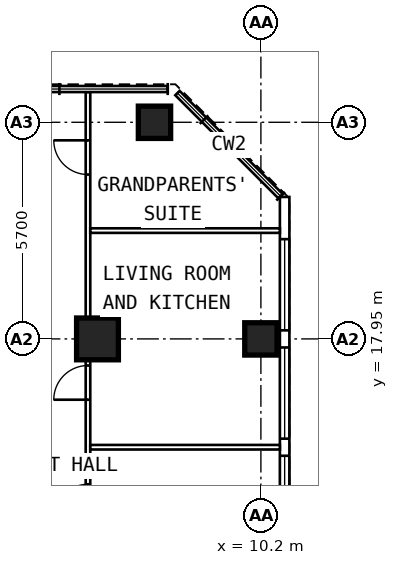
"""IFC4 building model, lengths in metres.
Left out: names, types, materials, properties, quantities, classifications, styles, units other than length and angle.
Written with IfcOpenShell. Run it as: python <this file> out.ifc"""

import sys

from ifc_helpers import new_model, si_unit, direction, frame, frame_2d, origin, origin_2d, place, context, subcontext, project, spatial, rectangle, extrude, element, fill, save


model = new_model("IFC4")
c1 = context("Model", 3, precision=1e-05, world=origin(), true_north=direction((0.0, 1.0)))
c2 = subcontext(c1, "Body", "Model", "MODEL_VIEW")
j1 = project(units=[si_unit("LENGTHUNIT", "METRE"), si_unit("PLANEANGLEUNIT", "RADIAN")], contexts=[c1])
p1 = place(None, origin())
s1 = spatial("IfcSite", under=j1, at=p1, CompositionType="ELEMENT")
p2 = place(p1, origin())
s2 = spatial("IfcBuilding", under=s1, at=p2, CompositionType="ELEMENT")
p3 = place(p2, frame((0.0, 0.0, 238.8)))
s3 = spatial("IfcBuildingStorey", under=s2, at=p3, CompositionType="ELEMENT", Elevation=238.8)
for number, where, z_axis, x_axis in (
    (1, (10.2, 17.95, 0.0), (0.0, 0.0, 1.0), (0.0, 1.0, 0.0)),
    (2, (7.4, 23.65, 0.0), (0.0, 0.0, 1.0), (0.0, 1.0, 0.0)),
):
    element("IfcColumn", number, at=place(p3, frame(where, z_axis=z_axis, x_axis=x_axis)), inside=s3, PredefinedType="COLUMN", context=c2, shape_type="SweptSolid", body=[
        extrude(rectangle(XDim=0.85, YDim=0.85, at=origin_2d()), origin(), (0.0, 0.0, 1.0), 3.6),
    ])
p4 = place(p3, frame((5.9, 17.95, 0.0), z_axis=(0.0, 0.0, 1.0), x_axis=(0.0, 1.0, 0.0)))
e3 = element("IfcColumn", 3, at=p4, inside=s3, PredefinedType="COLUMN", context=c2, shape_type="SweptSolid", body=[
    extrude(rectangle(XDim=1.1, YDim=1.1, at=origin_2d()), origin(), (0.0, 0.0, 1.0), 3.6),
])
p5 = place(p3, frame((10.825, 6.409, 0.0), z_axis=(0.0, 0.0, 1.0), x_axis=(0.0, 1.0, 0.0)))
e4 = element("IfcWall", 4, at=p5, inside=s3, PredefinedType="SOLIDWALL", context=c2, shape_type="SweptSolid", body=[
    extrude(rectangle(XDim=15.276, YDim=0.25, at=frame_2d((7.638, 0.0))), origin(), (0.0, 0.0, 1.0), 3.35),
])
p6 = place(p5, frame((0.366, 0.0, 0.8)))
e5 = element("IfcOpeningElement", 5, at=p6, cuts=e4, PredefinedType="OPENING", context=c2, shape_type="SweptSolid", body=[
    extrude(rectangle(XDim=2.4, YDim=1.8, at=frame_2d((1.2, 0.9))), frame((0.0, 0.137, 0.0), z_axis=(0.0, -1.0, 0.0), x_axis=(1.0, 0.0, 0.0)), (0.0, 0.0, 1.0), 0.274),
])
p7 = place(p5, frame((3.216, 0.0, 0.8)))
e6 = element("IfcOpeningElement", 6, at=p7, cuts=e4, PredefinedType="OPENING", context=c2, shape_type="SweptSolid", body=[
    extrude(rectangle(XDim=2.4, YDim=1.8, at=frame_2d((1.2, 0.9))), frame((0.0, 0.137, 0.0), z_axis=(0.0, -1.0, 0.0), x_axis=(1.0, 0.0, 0.0)), (0.0, 0.0, 1.0), 0.274),
])
p8 = place(p5, frame((6.066, 0.0, 0.8)))
e7 = element("IfcOpeningElement", 7, at=p8, cuts=e4, PredefinedType="OPENING", context=c2, shape_type="SweptSolid", body=[
    extrude(rectangle(XDim=2.4, YDim=1.8, at=frame_2d((1.2, 0.9))), frame((0.0, 0.137, 0.0), z_axis=(0.0, -1.0, 0.0), x_axis=(1.0, 0.0, 0.0)), (0.0, 0.0, 1.0), 0.274),
])
p9 = place(p5, frame((8.916, 0.0, 0.8)))
e8 = element("IfcOpeningElement", 8, at=p9, cuts=e4, PredefinedType="OPENING", context=c2, shape_type="SweptSolid", body=[
    extrude(rectangle(XDim=2.4, YDim=1.8, at=frame_2d((1.2, 0.9))), frame((0.0, 0.137, 0.0), z_axis=(0.0, -1.0, 0.0), x_axis=(1.0, 0.0, 0.0)), (0.0, 0.0, 1.0), 0.274),
])
p10 = place(p5, frame((11.766, 0.0, 0.8)))
e9 = element("IfcOpeningElement", 9, at=p10, cuts=e4, PredefinedType="OPENING", context=c2, shape_type="SweptSolid", body=[
    extrude(rectangle(XDim=2.4, YDim=1.8, at=frame_2d((1.2, 0.9))), frame((0.0, 0.137, 0.0), z_axis=(0.0, -1.0, 0.0), x_axis=(1.0, 0.0, 0.0)), (0.0, 0.0, 1.0), 0.274),
])
p11 = place(p3, frame((5.65, 9.6, 0.0), z_axis=(0.0, 0.0, 1.0), x_axis=(0.0, 1.0, 0.0)))
e10 = element("IfcWall", 10, at=p11, inside=s3, PredefinedType="PARTITIONING", context=c2, shape_type="SweptSolid", body=[
    extrude(rectangle(XDim=14.845, YDim=0.12, at=frame_2d((7.422, 0.0))), origin(), (0.0, 0.0, 1.0), 3.35),
])
p12 = place(p11, frame((1.05, 0.0, 0.0)))
e11 = element("IfcOpeningElement", 11, at=p12, cuts=e10, PredefinedType="OPENING", context=c2, shape_type="SweptSolid", body=[
    extrude(rectangle(XDim=0.9, YDim=2.1, at=frame_2d((0.45, 1.05))), frame((0.0, 0.072, 0.0), z_axis=(0.0, -1.0, 0.0), x_axis=(1.0, 0.0, 0.0)), (0.0, 0.0, 1.0), 0.144),
])
p13 = place(p11, frame((3.625, 0.0, 0.0)))
e12 = element("IfcOpeningElement", 12, at=p13, cuts=e10, PredefinedType="OPENING", context=c2, shape_type="SweptSolid", body=[
    extrude(rectangle(XDim=0.9, YDim=2.1, at=frame_2d((0.45, 1.05))), frame((0.0, 0.072, 0.0), z_axis=(0.0, -1.0, 0.0), x_axis=(1.0, 0.0, 0.0)), (0.0, 0.0, 1.0), 0.144),
])
p14 = place(p11, frame((6.75, 0.0, 0.0)))
e13 = element("IfcOpeningElement", 13, at=p14, cuts=e10, PredefinedType="OPENING", context=c2, shape_type="SweptSolid", body=[
    extrude(rectangle(XDim=0.9, YDim=2.1, at=frame_2d((0.45, 1.05))), frame((0.0, 0.072, 0.0), z_axis=(0.0, -1.0, 0.0), x_axis=(1.0, 0.0, 0.0)), (0.0, 0.0, 1.0), 0.144),
])
p15 = place(p11, frame((12.675, 0.0, 0.0)))
e14 = element("IfcOpeningElement", 14, at=p15, cuts=e10, PredefinedType="OPENING", context=c2, shape_type="SweptSolid", body=[
    extrude(rectangle(XDim=0.9, YDim=2.1, at=frame_2d((0.45, 1.05))), frame((0.0, 0.072, 0.0), z_axis=(0.0, -1.0, 0.0), x_axis=(1.0, 0.0, 0.0)), (0.0, 0.0, 1.0), 0.144),
])
for number, where, z_axis, x_axis in (
    (15, (5.71, 15.1, 0.0), (0.0, 0.0, 1.0), (1.0, 0.0, 0.0)),
    (16, (5.71, 20.8, 0.0), (0.0, 0.0, 1.0), (1.0, 0.0, 0.0)),
):
    element("IfcWall", number, at=place(p3, frame(where, z_axis=z_axis, x_axis=x_axis)), inside=s3, PredefinedType="PARTITIONING", context=c2, shape_type="SweptSolid", body=[
        extrude(rectangle(XDim=4.99, YDim=0.12, at=frame_2d((2.495, 0.0))), origin(), (0.0, 0.0, 1.0), 3.35),
    ])
p16 = place(p8, origin())
e17 = element("IfcWindow", 17, at=p16, inside=s3, PartitioningType="SINGLE_PANEL", PredefinedType="WINDOW", context=c2, shape_type="SweptSolid", body=[
    extrude(rectangle(XDim=2.4, YDim=1.8, at=frame_2d((1.2, 0.9))), frame((0.0, 0.03, 0.0), z_axis=(0.0, -1.0, 0.0), x_axis=(1.0, 0.0, 0.0)), (0.0, 0.0, 1.0), 0.06),
])
fill(e7, e17)
p17 = place(p9, origin())
e18 = element("IfcWindow", 18, at=p17, inside=s3, PartitioningType="SINGLE_PANEL", PredefinedType="WINDOW", context=c2, shape_type="SweptSolid", body=[
    extrude(rectangle(XDim=2.4, YDim=1.8, at=frame_2d((1.2, 0.9))), frame((0.0, 0.03, 0.0), z_axis=(0.0, -1.0, 0.0), x_axis=(1.0, 0.0, 0.0)), (0.0, 0.0, 1.0), 0.06),
])
fill(e8, e18)
p18 = place(p10, origin())
e19 = element("IfcWindow", 19, at=p18, inside=s3, PartitioningType="SINGLE_PANEL", PredefinedType="WINDOW", context=c2, shape_type="SweptSolid", body=[
    extrude(rectangle(XDim=2.4, YDim=1.8, at=frame_2d((1.2, 0.9))), frame((0.0, 0.03, 0.0), z_axis=(0.0, -1.0, 0.0), x_axis=(1.0, 0.0, 0.0)), (0.0, 0.0, 1.0), 0.06),
])
fill(e9, e19)
p19 = place(p13, origin())
e20 = element("IfcDoor", 20, at=p19, inside=s3, OperationType="SINGLE_SWING_LEFT", PredefinedType="DOOR", context=c2, shape_type="SweptSolid", body=[
    extrude(rectangle(XDim=0.9, YDim=2.1, at=frame_2d((0.45, 1.05))), frame((0.0, 0.025, 0.0), z_axis=(0.0, -1.0, 0.0), x_axis=(1.0, 0.0, 0.0)), (0.0, 0.0, 1.0), 0.05),
])
fill(e12, e20)
p20 = place(p14, origin())
e21 = element("IfcDoor", 21, at=p20, inside=s3, OperationType="SINGLE_SWING_LEFT", PredefinedType="DOOR", context=c2, shape_type="SweptSolid", body=[
    extrude(rectangle(XDim=0.9, YDim=2.1, at=frame_2d((0.45, 1.05))), frame((0.0, 0.025, 0.0), z_axis=(0.0, -1.0, 0.0), x_axis=(1.0, 0.0, 0.0)), (0.0, 0.0, 1.0), 0.05),
])
fill(e13, e21)
p21 = place(p15, origin())
e22 = element("IfcDoor", 22, at=p21, inside=s3, OperationType="SINGLE_SWING_RIGHT", PredefinedType="DOOR", context=c2, shape_type="SweptSolid", body=[
    extrude(rectangle(XDim=0.9, YDim=2.1, at=frame_2d((0.45, 1.05))), frame((0.0, 0.025, 0.0), z_axis=(0.0, -1.0, 0.0), x_axis=(1.0, 0.0, 0.0)), (0.0, 0.0, 1.0), 0.05),
])
fill(e14, e22)
save(model, sys.argv[1])
